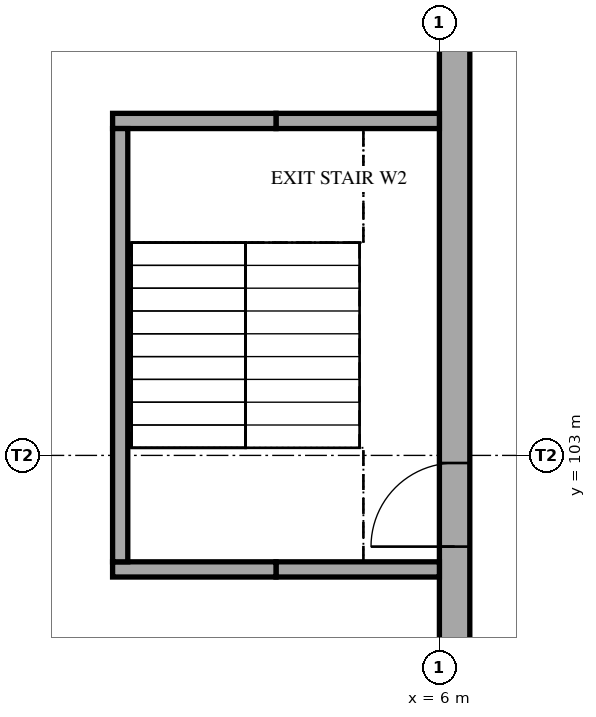
"""IFC4 building model, lengths in metres.
Left out: names, types, materials, properties, quantities, classifications, styles, units other than length and angle.
Written with IfcOpenShell. Run it as: python <this file> out.ifc"""

import sys

from ifc_helpers import new_model, si_unit, direction, frame, frame_2d, origin, place, context, subcontext, project, spatial, rectangle, extrude, element, fill, save


model = new_model("IFC4")
c1 = context("Model", 3, precision=1e-05, world=origin(), true_north=direction((0.0, 1.0)))
c2 = subcontext(c1, "Body", "Model", "MODEL_VIEW")
j1 = project(units=[si_unit("LENGTHUNIT", "METRE"), si_unit("PLANEANGLEUNIT", "RADIAN")], contexts=[c1])
p1 = place(None, origin())
s1 = spatial("IfcSite", under=j1, at=p1, CompositionType="ELEMENT")
p2 = place(p1, origin())
s2 = spatial("IfcBuilding", under=s1, at=p2, CompositionType="ELEMENT")
p3 = place(p2, frame((0.0, 0.0, -4.2)))
s3 = spatial("IfcBuildingStorey", under=s2, at=p3, CompositionType="ELEMENT", Elevation=-4.2)
p4 = place(p3, frame((6.2, 100.5, 0.0), z_axis=(0.0, 0.0, 1.0), x_axis=(0.0, 1.0, 0.0)))
e1 = element("IfcWall", 1, at=p4, inside=s3, PredefinedType="SOLIDWALL", context=c2, shape_type="SweptSolid", body=[
    extrude(rectangle(XDim=7.9, YDim=0.4, at=frame_2d((3.95, 0.0))), origin(), (0.0, 0.0, 1.0), 4.2),
])
p5 = place(p4, frame((1.3, 0.0, 0.0)))
e2 = element("IfcOpeningElement", 2, at=p5, cuts=e1, PredefinedType="OPENING", context=c2, shape_type="SweptSolid", body=[
    extrude(rectangle(XDim=1.1, YDim=2.1, at=frame_2d((0.55, 1.05))), frame((0.0, 0.21, 0.0), z_axis=(0.0, -1.0, 0.0), x_axis=(1.0, 0.0, 0.0)), (0.0, 0.0, 1.0), 0.42),
])
p6 = place(p3, frame((6.0, 107.4, 0.0), z_axis=(0.0, 0.0, 1.0), x_axis=(-1.0, 0.0, 0.0)))
e3 = element("IfcWall", 3, at=p6, inside=s3, PredefinedType="SOLIDWALL", context=c2, shape_type="SweptSolid", body=[
    extrude(rectangle(XDim=2.15, YDim=0.2, at=frame_2d((1.075, 0.0))), origin(), (0.0, 0.0, 1.0), 4.2),
])
p7 = place(p3, frame((3.85, 107.4, 0.0), z_axis=(0.0, 0.0, 1.0), x_axis=(-1.0, 0.0, 0.0)))
e4 = element("IfcWall", 4, at=p7, inside=s3, PredefinedType="SOLIDWALL", context=c2, shape_type="SweptSolid", body=[
    extrude(rectangle(XDim=2.15, YDim=0.2, at=frame_2d((1.075, 0.0))), origin(), (0.0, 0.0, 1.0), 4.2),
])
p8 = place(p3, frame((6.0, 101.5, 0.0), z_axis=(0.0, 0.0, 1.0), x_axis=(-1.0, 0.0, 0.0)))
e5 = element("IfcWall", 5, at=p8, inside=s3, PredefinedType="SOLIDWALL", context=c2, shape_type="SweptSolid", body=[
    extrude(rectangle(XDim=2.15, YDim=0.2, at=frame_2d((1.075, 0.0))), origin(), (0.0, 0.0, 1.0), 4.2),
])
p9 = place(p3, frame((3.85, 101.5, 0.0), z_axis=(0.0, 0.0, 1.0), x_axis=(-1.0, 0.0, 0.0)))
e6 = element("IfcWall", 6, at=p9, inside=s3, PredefinedType="SOLIDWALL", context=c2, shape_type="SweptSolid", body=[
    extrude(rectangle(XDim=2.15, YDim=0.2, at=frame_2d((1.075, 0.0))), origin(), (0.0, 0.0, 1.0), 4.2),
])
p10 = place(p3, frame((1.8, 107.3, 0.0), z_axis=(0.0, 0.0, 1.0), x_axis=(0.0, -1.0, 0.0)))
e7 = element("IfcWall", 7, at=p10, inside=s3, PredefinedType="SOLIDWALL", context=c2, shape_type="SweptSolid", body=[
    extrude(rectangle(XDim=5.7, YDim=0.2, at=frame_2d((2.85, 0.0))), origin(), (0.0, 0.0, 1.0), 4.2),
])
p11 = place(p5, origin())
e8 = element("IfcDoor", 8, at=p11, inside=s3, OperationType="SINGLE_SWING_LEFT", PredefinedType="DOOR", context=c2, shape_type="SweptSolid", body=[
    extrude(rectangle(XDim=1.1, YDim=2.1, at=frame_2d((0.55, 1.05))), frame((0.0, 0.025, 0.0), z_axis=(0.0, -1.0, 0.0), x_axis=(1.0, 0.0, 0.0)), (0.0, 0.0, 1.0), 0.05),
])
fill(e2, e8)
save(model, sys.argv[1])
